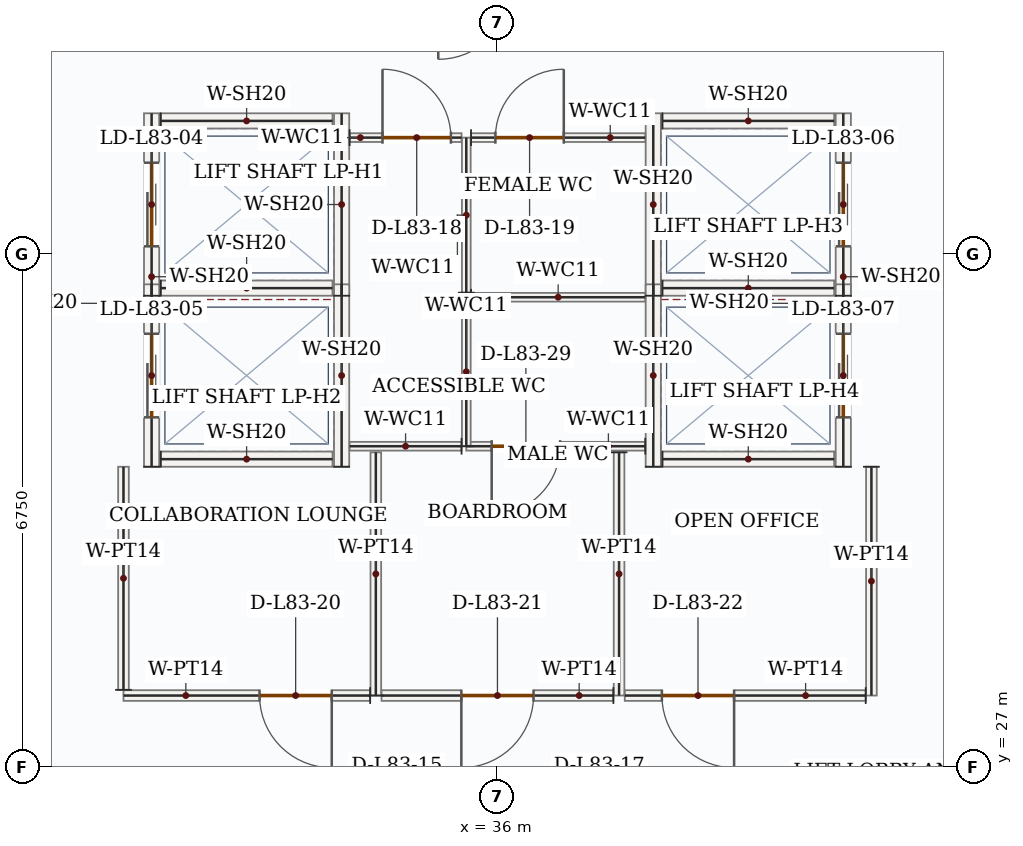
"""IFC4 building model, lengths in metres.
Left out: names, types, materials, properties, quantities, classifications, styles, units other than length and angle.
Written with IfcOpenShell. Run it as: python <this file> out.ifc"""

import sys

from ifc_helpers import new_model, si_unit, direction, frame, frame_2d, origin, place, context, subcontext, project, spatial, rectangle, extrude, source, transform, mapped, element, fill, save


model = new_model("IFC4")
c1 = context("Model", 3, precision=1e-05, world=origin(), true_north=direction((0.0, 1.0)))
c2 = subcontext(c1, "Body", "Model", "MODEL_VIEW")
j1 = project(units=[si_unit("LENGTHUNIT", "METRE"), si_unit("PLANEANGLEUNIT", "RADIAN")], contexts=[c1])
p1 = place(None, origin())
s1 = spatial("IfcSite", under=j1, at=p1, CompositionType="ELEMENT")
p2 = place(p1, origin())
s2 = spatial("IfcBuilding", under=s1, at=p2, CompositionType="ELEMENT")
p3 = place(p2, frame((0.0, 0.0, 342.3)))
s3 = spatial("IfcBuildingStorey", under=s2, at=p3, CompositionType="ELEMENT", Elevation=342.3)
p4 = place(p3, frame((31.45, 33.2, 0.0), z_axis=(0.0, 0.0, 1.0), x_axis=(0.0, 1.0, 0.0)))
e1 = element("IfcWall", 1, at=p4, inside=s3, PredefinedType="SOLIDWALL", context=c2, shape_type="SweptSolid", body=[
    extrude(rectangle(XDim=2.4, YDim=0.2, at=frame_2d((1.2, 0.0))), origin(), (0.0, 0.0, 1.0), 3.5),
])
p5 = place(p4, frame((0.65, 0.0, 0.0)))
e2 = element("IfcOpeningElement", 2, at=p5, cuts=e1, PredefinedType="OPENING", context=c2, shape_type="SweptSolid", body=[
    extrude(rectangle(XDim=1.1, YDim=2.15, at=frame_2d((0.55, 1.075))), frame((0.0, 0.11, 0.0), z_axis=(0.0, -1.0, 0.0), x_axis=(1.0, 0.0, 0.0)), (0.0, 0.0, 1.0), 0.22),
])
m1 = source(origin(), c2, "Body", "SweptSolid", [
    extrude(rectangle(XDim=2.4, YDim=0.2, at=frame_2d((1.2, 0.0))), origin(), (0.0, 0.0, 1.0), 3.5),
])
p6 = place(p3, frame((33.95, 33.2, 0.0), z_axis=(0.0, 0.0, 1.0), x_axis=(0.0, 1.0, 0.0)))
e3 = element("IfcWall", 3, at=p6, inside=s3, PredefinedType="SOLIDWALL", context=c2, shape_type="MappedRepresentation", body=[
    mapped(m1, transform((0.0, 0.0, 0.0), x_axis=(1.0, 0.0, 0.0), y_axis=(0.0, 1.0, 0.0), z_axis=(0.0, 0.0, 1.0), scale=1.0)),
])
m2 = source(origin(), c2, "Body", "SweptSolid", [
    extrude(rectangle(XDim=2.26, YDim=0.2, at=frame_2d((1.13, 0.0))), origin(), (0.0, 0.0, 1.0), 3.5),
])
for number, where, z_axis, x_axis in (
    (4, (31.57, 33.3, 0.0), (0.0, 0.0, 1.0), (1.0, 0.0, 0.0)),
    (5, (31.57, 35.5, 0.0), (0.0, 0.0, 1.0), (1.0, 0.0, 0.0)),
):
    element("IfcWall", number, at=place(p3, frame(where, z_axis=z_axis, x_axis=x_axis)), inside=s3, PredefinedType="SOLIDWALL", context=c2, shape_type="MappedRepresentation", body=[
        mapped(m2, transform((0.0, 0.0, 0.0), x_axis=(1.0, 0.0, 0.0), y_axis=(0.0, 1.0, 0.0), z_axis=(0.0, 0.0, 1.0), scale=1.0)),
    ])
p7 = place(p3, frame((31.45, 30.95, 0.0), z_axis=(0.0, 0.0, 1.0), x_axis=(0.0, 1.0, 0.0)))
e6 = element("IfcWall", 6, at=p7, inside=s3, PredefinedType="SOLIDWALL", context=c2, shape_type="SweptSolid", body=[
    extrude(rectangle(XDim=2.4, YDim=0.2, at=frame_2d((1.2, 0.0))), origin(), (0.0, 0.0, 1.0), 3.5),
])
p8 = place(p7, frame((0.65, 0.0, 0.0)))
e7 = element("IfcOpeningElement", 7, at=p8, cuts=e6, PredefinedType="OPENING", context=c2, shape_type="SweptSolid", body=[
    extrude(rectangle(XDim=1.1, YDim=2.15, at=frame_2d((0.55, 1.075))), frame((0.0, 0.11, 0.0), z_axis=(0.0, -1.0, 0.0), x_axis=(1.0, 0.0, 0.0)), (0.0, 0.0, 1.0), 0.22),
])
p9 = place(p3, frame((33.95, 30.95, 0.0), z_axis=(0.0, 0.0, 1.0), x_axis=(0.0, 1.0, 0.0)))
e8 = element("IfcWall", 8, at=p9, inside=s3, PredefinedType="SOLIDWALL", context=c2, shape_type="MappedRepresentation", body=[
    mapped(m1, transform((0.0, 0.0, 0.0), x_axis=(1.0, 0.0, 0.0), y_axis=(0.0, 1.0, 0.0), z_axis=(0.0, 0.0, 1.0), scale=1.0)),
])
p10 = place(p3, frame((31.57, 31.05, 0.0), z_axis=(0.0, 0.0, 1.0), x_axis=(1.0, 0.0, 0.0)))
e9 = element("IfcWall", 9, at=p10, inside=s3, PredefinedType="SOLIDWALL", context=c2, shape_type="MappedRepresentation", body=[
    mapped(m2, transform((0.0, 0.0, 0.0), x_axis=(1.0, 0.0, 0.0), y_axis=(0.0, 1.0, 0.0), z_axis=(0.0, 0.0, 1.0), scale=1.0)),
])
p11 = place(p3, frame((38.05, 33.2, 0.0), z_axis=(0.0, 0.0, 1.0), x_axis=(0.0, 1.0, 0.0)))
e10 = element("IfcWall", 10, at=p11, inside=s3, PredefinedType="SOLIDWALL", context=c2, shape_type="MappedRepresentation", body=[
    mapped(m1, transform((0.0, 0.0, 0.0), x_axis=(1.0, 0.0, 0.0), y_axis=(0.0, 1.0, 0.0), z_axis=(0.0, 0.0, 1.0), scale=1.0)),
])
p12 = place(p3, frame((40.55, 33.2, 0.0), z_axis=(0.0, 0.0, 1.0), x_axis=(0.0, 1.0, 0.0)))
e11 = element("IfcWall", 11, at=p12, inside=s3, PredefinedType="SOLIDWALL", context=c2, shape_type="SweptSolid", body=[
    extrude(rectangle(XDim=2.4, YDim=0.2, at=frame_2d((1.2, 0.0))), origin(), (0.0, 0.0, 1.0), 3.5),
])
p13 = place(p12, frame((0.65, 0.0, 0.0)))
e12 = element("IfcOpeningElement", 12, at=p13, cuts=e11, PredefinedType="OPENING", context=c2, shape_type="SweptSolid", body=[
    extrude(rectangle(XDim=1.1, YDim=2.15, at=frame_2d((0.55, 1.075))), frame((0.0, 0.11, 0.0), z_axis=(0.0, -1.0, 0.0), x_axis=(1.0, 0.0, 0.0)), (0.0, 0.0, 1.0), 0.22),
])
for number, where, z_axis, x_axis in (
    (13, (38.17, 33.3, 0.0), (0.0, 0.0, 1.0), (1.0, 0.0, 0.0)),
    (14, (38.17, 35.5, 0.0), (0.0, 0.0, 1.0), (1.0, 0.0, 0.0)),
):
    element("IfcWall", number, at=place(p3, frame(where, z_axis=z_axis, x_axis=x_axis)), inside=s3, PredefinedType="SOLIDWALL", context=c2, shape_type="MappedRepresentation", body=[
        mapped(m2, transform((0.0, 0.0, 0.0), x_axis=(1.0, 0.0, 0.0), y_axis=(0.0, 1.0, 0.0), z_axis=(0.0, 0.0, 1.0), scale=1.0)),
    ])
p14 = place(p3, frame((38.05, 30.95, 0.0), z_axis=(0.0, 0.0, 1.0), x_axis=(0.0, 1.0, 0.0)))
e15 = element("IfcWall", 15, at=p14, inside=s3, PredefinedType="SOLIDWALL", context=c2, shape_type="MappedRepresentation", body=[
    mapped(m1, transform((0.0, 0.0, 0.0), x_axis=(1.0, 0.0, 0.0), y_axis=(0.0, 1.0, 0.0), z_axis=(0.0, 0.0, 1.0), scale=1.0)),
])
p15 = place(p3, frame((40.55, 30.95, 0.0), z_axis=(0.0, 0.0, 1.0), x_axis=(0.0, 1.0, 0.0)))
e16 = element("IfcWall", 16, at=p15, inside=s3, PredefinedType="SOLIDWALL", context=c2, shape_type="SweptSolid", body=[
    extrude(rectangle(XDim=2.4, YDim=0.2, at=frame_2d((1.2, 0.0))), origin(), (0.0, 0.0, 1.0), 3.5),
])
p16 = place(p15, frame((0.65, 0.0, 0.0)))
e17 = element("IfcOpeningElement", 17, at=p16, cuts=e16, PredefinedType="OPENING", context=c2, shape_type="SweptSolid", body=[
    extrude(rectangle(XDim=1.1, YDim=2.15, at=frame_2d((0.55, 1.075))), frame((0.0, 0.11, 0.0), z_axis=(0.0, -1.0, 0.0), x_axis=(1.0, 0.0, 0.0)), (0.0, 0.0, 1.0), 0.22),
])
p17 = place(p3, frame((38.17, 31.05, 0.0), z_axis=(0.0, 0.0, 1.0), x_axis=(1.0, 0.0, 0.0)))
e18 = element("IfcWall", 18, at=p17, inside=s3, PredefinedType="SOLIDWALL", context=c2, shape_type="MappedRepresentation", body=[
    mapped(m2, transform((0.0, 0.0, 0.0), x_axis=(1.0, 0.0, 0.0), y_axis=(0.0, 1.0, 0.0), z_axis=(0.0, 0.0, 1.0), scale=1.0)),
])
p18 = place(p3, frame((37.945, 31.22, 0.0), z_axis=(0.0, 0.0, 1.0), x_axis=(-1.0, 0.0, 0.0)))
e19 = element("IfcWall", 19, at=p18, inside=s3, PredefinedType="PARTITIONING", context=c2, shape_type="SweptSolid", body=[
    extrude(rectangle(XDim=2.355, YDim=0.115, at=frame_2d((1.177, 0.0))), origin(), (0.0, 0.0, 1.0), 3.5),
])
p19 = place(p18, frame((1.121, 0.0, 0.0)))
e20 = element("IfcOpeningElement", 20, at=p19, cuts=e19, PredefinedType="OPENING", context=c2, shape_type="SweptSolid", body=[
    extrude(rectangle(XDim=0.9, YDim=2.1, at=frame_2d((0.45, 1.05))), frame((0.0, 0.067, 0.0), z_axis=(0.0, -1.0, 0.0), x_axis=(1.0, 0.0, 0.0)), (0.0, 0.0, 1.0), 0.135),
])
m3 = source(origin(), c2, "Body", "SweptSolid", [
    extrude(rectangle(XDim=1.96, YDim=0.115, at=frame_2d((0.98, 0.0))), origin(), (0.0, 0.0, 1.0), 3.5),
])
p20 = place(p3, frame((35.59, 31.22, 0.0), z_axis=(0.0, 0.0, 1.0), x_axis=(0.0, 1.0, 0.0)))
e21 = element("IfcWall", 21, at=p20, inside=s3, PredefinedType="PARTITIONING", context=c2, shape_type="MappedRepresentation", body=[
    mapped(m3, transform((0.0, 0.0, 0.0), x_axis=(1.0, 0.0, 0.0), y_axis=(0.0, 1.0, 0.0), z_axis=(0.0, 0.0, 1.0), scale=1.0)),
])
m4 = source(origin(), c2, "Body", "SweptSolid", [
    extrude(rectangle(XDim=2.292, YDim=0.115, at=frame_2d((1.146, 0.0))), origin(), (0.0, 0.0, 1.0), 3.5),
])
p21 = place(p3, frame((35.653, 33.18, 0.0), z_axis=(0.0, 0.0, 1.0), x_axis=(1.0, 0.0, 0.0)))
e22 = element("IfcWall", 22, at=p21, inside=s3, PredefinedType="PARTITIONING", context=c2, shape_type="MappedRepresentation", body=[
    mapped(m4, transform((0.0, 0.0, 0.0), x_axis=(1.0, 0.0, 0.0), y_axis=(0.0, 1.0, 0.0), z_axis=(0.0, 0.0, 1.0), scale=1.0)),
])
m5 = source(origin(), c2, "Body", "SweptSolid", [
    extrude(rectangle(XDim=2.04, YDim=0.115, at=frame_2d((1.02, 0.0))), origin(), (0.0, 0.0, 1.0), 3.5),
])
p22 = place(p3, frame((35.59, 33.24, 0.0), z_axis=(0.0, 0.0, 1.0), x_axis=(0.0, 1.0, 0.0)))
e23 = element("IfcWall", 23, at=p22, inside=s3, PredefinedType="PARTITIONING", context=c2, shape_type="MappedRepresentation", body=[
    mapped(m5, transform((0.0, 0.0, 0.0), x_axis=(1.0, 0.0, 0.0), y_axis=(0.0, 1.0, 0.0), z_axis=(0.0, 0.0, 1.0), scale=1.0)),
])
p23 = place(p3, frame((35.653, 35.28, 0.0), z_axis=(0.0, 0.0, 1.0), x_axis=(1.0, 0.0, 0.0)))
e24 = element("IfcWall", 24, at=p23, inside=s3, PredefinedType="PARTITIONING", context=c2, shape_type="SweptSolid", body=[
    extrude(rectangle(XDim=2.292, YDim=0.115, at=frame_2d((1.146, 0.0))), origin(), (0.0, 0.0, 1.0), 3.5),
])
p24 = place(p23, frame((0.32, 0.0, 0.0)))
e25 = element("IfcOpeningElement", 25, at=p24, cuts=e24, PredefinedType="OPENING", context=c2, shape_type="SweptSolid", body=[
    extrude(rectangle(XDim=0.9, YDim=2.1, at=frame_2d((0.45, 1.05))), frame((0.0, 0.067, 0.0), z_axis=(0.0, -1.0, 0.0), x_axis=(1.0, 0.0, 0.0)), (0.0, 0.0, 1.0), 0.135),
])
m6 = source(origin(), c2, "Body", "SweptSolid", [
    extrude(rectangle(XDim=1.473, YDim=0.115, at=frame_2d((0.736, 0.0))), origin(), (0.0, 0.0, 1.0), 3.5),
])
p25 = place(p3, frame((35.528, 31.22, 0.0), z_axis=(0.0, 0.0, 1.0), x_axis=(-1.0, 0.0, 0.0)))
e26 = element("IfcWall", 26, at=p25, inside=s3, PredefinedType="PARTITIONING", context=c2, shape_type="MappedRepresentation", body=[
    mapped(m6, transform((0.0, 0.0, 0.0), x_axis=(1.0, 0.0, 0.0), y_axis=(0.0, 1.0, 0.0), z_axis=(0.0, 0.0, 1.0), scale=1.0)),
])
p26 = place(p3, frame((34.055, 35.28, 0.0), z_axis=(0.0, 0.0, 1.0), x_axis=(1.0, 0.0, 0.0)))
e27 = element("IfcWall", 27, at=p26, inside=s3, PredefinedType="PARTITIONING", context=c2, shape_type="SweptSolid", body=[
    extrude(rectangle(XDim=1.473, YDim=0.115, at=frame_2d((0.736, 0.0))), origin(), (0.0, 0.0, 1.0), 3.5),
])
p27 = place(p26, frame((0.433, 0.0, 0.0)))
e28 = element("IfcOpeningElement", 28, at=p27, cuts=e27, PredefinedType="OPENING", context=c2, shape_type="SweptSolid", body=[
    extrude(rectangle(XDim=0.9, YDim=2.1, at=frame_2d((0.45, 1.05))), frame((0.0, 0.067, 0.0), z_axis=(0.0, -1.0, 0.0), x_axis=(1.0, 0.0, 0.0)), (0.0, 0.0, 1.0), 0.135),
])
m7 = source(origin(), c2, "Body", "SweptSolid", [
    extrude(rectangle(XDim=3.2, YDim=0.14, at=frame_2d((1.6, 0.0))), origin(), (0.0, 0.0, 1.0), 3.5),
])
for number, where, z_axis, x_axis in (
    (29, (34.4, 27.94, 0.0), (0.0, 0.0, 1.0), (0.0, 1.0, 0.0)),
    (30, (37.6, 31.14, 0.0), (0.0, 0.0, 1.0), (0.0, -1.0, 0.0)),
):
    element("IfcWall", number, at=place(p3, frame(where, z_axis=z_axis, x_axis=x_axis)), inside=s3, PredefinedType="PARTITIONING", context=c2, shape_type="MappedRepresentation", body=[
        mapped(m7, transform((0.0, 0.0, 0.0), x_axis=(1.0, 0.0, 0.0), y_axis=(0.0, 1.0, 0.0), z_axis=(0.0, 0.0, 1.0), scale=1.0)),
    ])
p28 = place(p3, frame((37.525, 27.94, 0.0), z_axis=(0.0, 0.0, 1.0), x_axis=(-1.0, 0.0, 0.0)))
e31 = element("IfcWall", 31, at=p28, inside=s3, PredefinedType="PARTITIONING", context=c2, shape_type="SweptSolid", body=[
    extrude(rectangle(XDim=3.05, YDim=0.14, at=frame_2d((1.525, 0.0))), origin(), (0.0, 0.0, 1.0), 3.5),
])
p29 = place(p28, frame((1.05, 0.0, 0.0)))
e32 = element("IfcOpeningElement", 32, at=p29, cuts=e31, PredefinedType="OPENING", context=c2, shape_type="SweptSolid", body=[
    extrude(rectangle(XDim=0.95, YDim=2.15, at=frame_2d((0.475, 1.075))), frame((0.0, 0.08, 0.0), z_axis=(0.0, -1.0, 0.0), x_axis=(1.0, 0.0, 0.0)), (0.0, 0.0, 1.0), 0.16),
])
p30 = place(p3, frame((34.325, 27.94, 0.0), z_axis=(0.0, 0.0, 1.0), x_axis=(-1.0, 0.0, 0.0)))
e33 = element("IfcWall", 33, at=p30, inside=s3, PredefinedType="PARTITIONING", context=c2, shape_type="SweptSolid", body=[
    extrude(rectangle(XDim=3.245, YDim=0.14, at=frame_2d((1.623, 0.0))), origin(), (0.0, 0.0, 1.0), 3.5),
])
p31 = place(p30, frame((0.505, 0.0, 0.0)))
e34 = element("IfcOpeningElement", 34, at=p31, cuts=e33, PredefinedType="OPENING", context=c2, shape_type="SweptSolid", body=[
    extrude(rectangle(XDim=0.95, YDim=2.15, at=frame_2d((0.475, 1.075))), frame((0.0, 0.08, 0.0), z_axis=(0.0, -1.0, 0.0), x_axis=(1.0, 0.0, 0.0)), (0.0, 0.0, 1.0), 0.16),
])
m8 = source(origin(), c2, "Body", "SweptSolid", [
    extrude(rectangle(XDim=2.935, YDim=0.14, at=frame_2d((1.468, 0.0))), origin(), (0.0, 0.0, 1.0), 3.5),
])
p32 = place(p3, frame((31.08, 28.015, 0.0), z_axis=(0.0, 0.0, 1.0), x_axis=(0.0, 1.0, 0.0)))
e35 = element("IfcWall", 35, at=p32, inside=s3, PredefinedType="PARTITIONING", context=c2, shape_type="MappedRepresentation", body=[
    mapped(m8, transform((0.0, 0.0, 0.0), x_axis=(1.0, 0.0, 0.0), y_axis=(0.0, 1.0, 0.0), z_axis=(0.0, 0.0, 1.0), scale=1.0)),
])
m9 = source(origin(), c2, "Body", "SweptSolid", [
    extrude(rectangle(XDim=3.01, YDim=0.14, at=frame_2d((1.505, 0.0))), origin(), (0.0, 0.0, 1.0), 3.5),
])
p33 = place(p3, frame((40.92, 30.95, 0.0), z_axis=(0.0, 0.0, 1.0), x_axis=(0.0, -1.0, 0.0)))
e36 = element("IfcWall", 36, at=p33, inside=s3, PredefinedType="PARTITIONING", context=c2, shape_type="MappedRepresentation", body=[
    mapped(m9, transform((0.0, 0.0, 0.0), x_axis=(1.0, 0.0, 0.0), y_axis=(0.0, 1.0, 0.0), z_axis=(0.0, 0.0, 1.0), scale=1.0)),
])
p34 = place(p3, frame((40.845, 27.94, 0.0), z_axis=(0.0, 0.0, 1.0), x_axis=(-1.0, 0.0, 0.0)))
e37 = element("IfcWall", 37, at=p34, inside=s3, PredefinedType="PARTITIONING", context=c2, shape_type="SweptSolid", body=[
    extrude(rectangle(XDim=3.17, YDim=0.14, at=frame_2d((1.585, 0.0))), origin(), (0.0, 0.0, 1.0), 3.5),
])
p35 = place(p34, frame((1.732, 0.0, 0.0)))
e38 = element("IfcOpeningElement", 38, at=p35, cuts=e37, PredefinedType="OPENING", context=c2, shape_type="SweptSolid", body=[
    extrude(rectangle(XDim=0.95, YDim=2.15, at=frame_2d((0.475, 1.075))), frame((0.0, 0.08, 0.0), z_axis=(0.0, -1.0, 0.0), x_axis=(1.0, 0.0, 0.0)), (0.0, 0.0, 1.0), 0.16),
])
m10 = source(origin(), c2, "Body", "SweptSolid", [
    extrude(rectangle(XDim=1.1, YDim=2.15, at=frame_2d((0.55, 1.075))), frame((0.0, 0.025, 0.0), z_axis=(0.0, -1.0, 0.0), x_axis=(1.0, 0.0, 0.0)), (0.0, 0.0, 1.0), 0.05),
])
p36 = place(p5, origin())
e39 = element("IfcDoor", 39, at=p36, inside=s3, OperationType="DOUBLE_DOOR_SLIDING", PredefinedType="DOOR", context=c2, shape_type="MappedRepresentation", body=[
    mapped(m10, transform((0.0, 0.0, 0.0), x_axis=(1.0, 0.0, 0.0), y_axis=(0.0, 1.0, 0.0), z_axis=(0.0, 0.0, 1.0), scale=1.0)),
])
fill(e2, e39)
p37 = place(p8, origin())
e40 = element("IfcDoor", 40, at=p37, inside=s3, OperationType="DOUBLE_DOOR_SLIDING", PredefinedType="DOOR", context=c2, shape_type="MappedRepresentation", body=[
    mapped(m10, transform((0.0, 0.0, 0.0), x_axis=(1.0, 0.0, 0.0), y_axis=(0.0, 1.0, 0.0), z_axis=(0.0, 0.0, 1.0), scale=1.0)),
])
fill(e7, e40)
p38 = place(p13, origin())
e41 = element("IfcDoor", 41, at=p38, inside=s3, OperationType="DOUBLE_DOOR_SLIDING", PredefinedType="DOOR", context=c2, shape_type="MappedRepresentation", body=[
    mapped(m10, transform((0.0, 0.0, 0.0), x_axis=(1.0, 0.0, 0.0), y_axis=(0.0, 1.0, 0.0), z_axis=(0.0, 0.0, 1.0), scale=1.0)),
])
fill(e12, e41)
p39 = place(p16, origin())
e42 = element("IfcDoor", 42, at=p39, inside=s3, OperationType="DOUBLE_DOOR_SLIDING", PredefinedType="DOOR", context=c2, shape_type="MappedRepresentation", body=[
    mapped(m10, transform((0.0, 0.0, 0.0), x_axis=(1.0, 0.0, 0.0), y_axis=(0.0, 1.0, 0.0), z_axis=(0.0, 0.0, 1.0), scale=1.0)),
])
fill(e17, e42)
m11 = source(origin(), c2, "Body", "SweptSolid", [
    extrude(rectangle(XDim=0.9, YDim=2.1, at=frame_2d((0.45, 1.05))), frame((0.0, 0.025, 0.0), z_axis=(0.0, -1.0, 0.0), x_axis=(1.0, 0.0, 0.0)), (0.0, 0.0, 1.0), 0.05),
])
p40 = place(p27, origin())
e43 = element("IfcDoor", 43, at=p40, inside=s3, OperationType="SINGLE_SWING_LEFT", PredefinedType="DOOR", context=c2, shape_type="MappedRepresentation", body=[
    mapped(m11, transform((0.0, 0.0, 0.0), x_axis=(1.0, 0.0, 0.0), y_axis=(0.0, 1.0, 0.0), z_axis=(0.0, 0.0, 1.0), scale=1.0)),
])
fill(e28, e43)
p41 = place(p24, origin())
e44 = element("IfcDoor", 44, at=p41, inside=s3, OperationType="SINGLE_SWING_RIGHT", PredefinedType="DOOR", context=c2, shape_type="MappedRepresentation", body=[
    mapped(m11, transform((0.0, 0.0, 0.0), x_axis=(1.0, 0.0, 0.0), y_axis=(0.0, 1.0, 0.0), z_axis=(0.0, 0.0, 1.0), scale=1.0)),
])
fill(e25, e44)
m12 = source(origin(), c2, "Body", "SweptSolid", [
    extrude(rectangle(XDim=0.95, YDim=2.15, at=frame_2d((0.475, 1.075))), frame((0.0, 0.025, 0.0), z_axis=(0.0, -1.0, 0.0), x_axis=(1.0, 0.0, 0.0)), (0.0, 0.0, 1.0), 0.05),
])
p42 = place(p31, origin())
e45 = element("IfcDoor", 45, at=p42, inside=s3, OperationType="SINGLE_SWING_LEFT", PredefinedType="DOOR", context=c2, shape_type="MappedRepresentation", body=[
    mapped(m12, transform((0.0, 0.0, 0.0), x_axis=(1.0, 0.0, 0.0), y_axis=(0.0, 1.0, 0.0), z_axis=(0.0, 0.0, 1.0), scale=1.0)),
])
fill(e34, e45)
p43 = place(p29, origin())
e46 = element("IfcDoor", 46, at=p43, inside=s3, OperationType="SINGLE_SWING_RIGHT", PredefinedType="DOOR", context=c2, shape_type="MappedRepresentation", body=[
    mapped(m12, transform((0.0, 0.0, 0.0), x_axis=(1.0, 0.0, 0.0), y_axis=(0.0, 1.0, 0.0), z_axis=(0.0, 0.0, 1.0), scale=1.0)),
])
fill(e32, e46)
p44 = place(p35, origin())
e47 = element("IfcDoor", 47, at=p44, inside=s3, OperationType="SINGLE_SWING_LEFT", PredefinedType="DOOR", context=c2, shape_type="MappedRepresentation", body=[
    mapped(m12, transform((0.0, 0.0, 0.0), x_axis=(1.0, 0.0, 0.0), y_axis=(0.0, 1.0, 0.0), z_axis=(0.0, 0.0, 1.0), scale=1.0)),
])
fill(e38, e47)
p45 = place(p19, origin())
e48 = element("IfcDoor", 48, at=p45, inside=s3, OperationType="SINGLE_SWING_RIGHT", PredefinedType="DOOR", context=c2, shape_type="MappedRepresentation", body=[
    mapped(m11, transform((0.0, 0.0, 0.0), x_axis=(1.0, 0.0, 0.0), y_axis=(0.0, 1.0, 0.0), z_axis=(0.0, 0.0, 1.0), scale=1.0)),
])
fill(e20, e48)
save(model, sys.argv[1])
